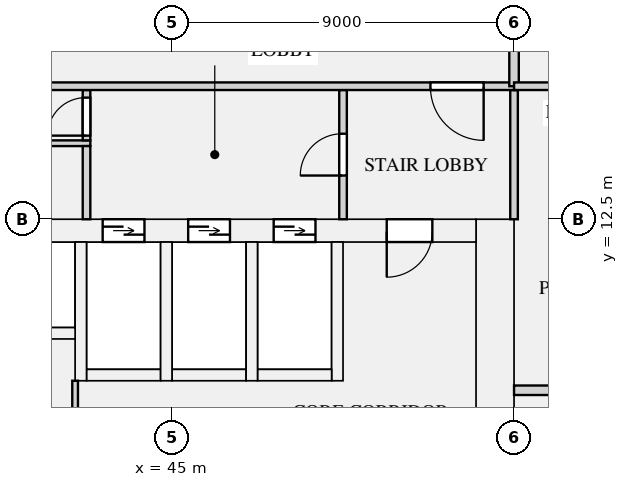
"""IFC4 building model, lengths in metres.
Left out: names, types, materials, properties, quantities, classifications, styles, units other than length and angle.
Written with IfcOpenShell. Run it as: python <this file> out.ifc"""

import sys

from ifc_helpers import new_model, si_unit, direction, frame, frame_2d, origin, place, context, subcontext, project, spatial, rectangle, extrude, element, fill, save


model = new_model("IFC4")
c1 = context("Model", 3, precision=1e-05, world=origin(), true_north=direction((0.0, 1.0)))
c2 = subcontext(c1, "Body", "Model", "MODEL_VIEW")
j1 = project(units=[si_unit("LENGTHUNIT", "METRE"), si_unit("PLANEANGLEUNIT", "RADIAN")], contexts=[c1])
p1 = place(None, origin())
s1 = spatial("IfcSite", under=j1, at=p1, CompositionType="ELEMENT")
p2 = place(p1, origin())
s2 = spatial("IfcBuilding", under=s1, at=p2, CompositionType="ELEMENT")
p3 = place(p2, frame((0.0, 0.0, 6.5)))
s3 = spatial("IfcBuildingStorey", under=s2, at=p3, CompositionType="ELEMENT", Elevation=6.5)
p4 = place(p3, frame((53.5, 0.0, 0.0), z_axis=(0.0, 0.0, 1.0), x_axis=(0.0, 1.0, 0.0)))
e1 = element("IfcWall", 1, at=p4, inside=s3, PredefinedType="SHEAR", context=c2, shape_type="SweptSolid", body=[
    extrude(rectangle(XDim=12.5, YDim=1.0, at=frame_2d((6.25, 0.0))), origin(), (0.0, 0.0, 1.0), 4.5),
])
p5 = place(p3, frame((19.0, 12.2, 0.0), z_axis=(0.0, 0.0, 1.0), x_axis=(1.0, 0.0, 0.0)))
e2 = element("IfcWall", 2, at=p5, inside=s3, PredefinedType="SHEAR", context=c2, shape_type="SweptSolid", body=[
    extrude(rectangle(XDim=34.0, YDim=0.6, at=frame_2d((17.0, 0.0))), origin(), (0.0, 0.0, 1.0), 4.5),
])
p6 = place(p5, frame((4.475, 0.0, 0.0)))
e3 = element("IfcOpeningElement", 3, at=p6, cuts=e2, PredefinedType="OPENING", context=c2, shape_type="SweptSolid", body=[
    extrude(rectangle(XDim=1.2, YDim=2.1, at=frame_2d((0.6, 1.05))), frame((0.0, 0.31, 0.0), z_axis=(0.0, -1.0, 0.0), x_axis=(1.0, 0.0, 0.0)), (0.0, 0.0, 1.0), 0.62),
])
p7 = place(p5, frame((7.325, 0.0, 0.0)))
e4 = element("IfcOpeningElement", 4, at=p7, cuts=e2, PredefinedType="OPENING", context=c2, shape_type="SweptSolid", body=[
    extrude(rectangle(XDim=1.2, YDim=2.1, at=frame_2d((0.6, 1.05))), frame((0.0, 0.31, 0.0), z_axis=(0.0, -1.0, 0.0), x_axis=(1.0, 0.0, 0.0)), (0.0, 0.0, 1.0), 0.62),
])
p8 = place(p5, frame((10.175, 0.0, 0.0)))
e5 = element("IfcOpeningElement", 5, at=p8, cuts=e2, PredefinedType="OPENING", context=c2, shape_type="SweptSolid", body=[
    extrude(rectangle(XDim=1.2, YDim=2.1, at=frame_2d((0.6, 1.05))), frame((0.0, 0.31, 0.0), z_axis=(0.0, -1.0, 0.0), x_axis=(1.0, 0.0, 0.0)), (0.0, 0.0, 1.0), 0.62),
])
p9 = place(p5, frame((13.025, 0.0, 0.0)))
e6 = element("IfcOpeningElement", 6, at=p9, cuts=e2, PredefinedType="OPENING", context=c2, shape_type="SweptSolid", body=[
    extrude(rectangle(XDim=1.2, YDim=2.1, at=frame_2d((0.6, 1.05))), frame((0.0, 0.31, 0.0), z_axis=(0.0, -1.0, 0.0), x_axis=(1.0, 0.0, 0.0)), (0.0, 0.0, 1.0), 0.62),
])
p10 = place(p5, frame((15.875, 0.0, 0.0)))
e7 = element("IfcOpeningElement", 7, at=p10, cuts=e2, PredefinedType="OPENING", context=c2, shape_type="SweptSolid", body=[
    extrude(rectangle(XDim=1.2, YDim=2.1, at=frame_2d((0.6, 1.05))), frame((0.0, 0.31, 0.0), z_axis=(0.0, -1.0, 0.0), x_axis=(1.0, 0.0, 0.0)), (0.0, 0.0, 1.0), 0.62),
])
p11 = place(p5, frame((24.175, 0.0, 0.0)))
e8 = element("IfcOpeningElement", 8, at=p11, cuts=e2, PredefinedType="OPENING", context=c2, shape_type="SweptSolid", body=[
    extrude(rectangle(XDim=1.1, YDim=2.1, at=frame_2d((0.55, 1.05))), frame((0.0, 0.31, 0.0), z_axis=(0.0, -1.0, 0.0), x_axis=(1.0, 0.0, 0.0)), (0.0, 0.0, 1.0), 0.62),
])
p12 = place(p5, frame((26.425, 0.0, 0.0)))
e9 = element("IfcOpeningElement", 9, at=p12, cuts=e2, PredefinedType="OPENING", context=c2, shape_type="SweptSolid", body=[
    extrude(rectangle(XDim=1.1, YDim=2.1, at=frame_2d((0.55, 1.05))), frame((0.0, 0.31, 0.0), z_axis=(0.0, -1.0, 0.0), x_axis=(1.0, 0.0, 0.0)), (0.0, 0.0, 1.0), 0.62),
])
p13 = place(p5, frame((28.675, 0.0, 0.0)))
e10 = element("IfcOpeningElement", 10, at=p13, cuts=e2, PredefinedType="OPENING", context=c2, shape_type="SweptSolid", body=[
    extrude(rectangle(XDim=1.1, YDim=2.1, at=frame_2d((0.55, 1.05))), frame((0.0, 0.31, 0.0), z_axis=(0.0, -1.0, 0.0), x_axis=(1.0, 0.0, 0.0)), (0.0, 0.0, 1.0), 0.62),
])
p14 = place(p5, frame((1.15, 0.0, 0.0)))
e11 = element("IfcOpeningElement", 11, at=p14, cuts=e2, PredefinedType="OPENING", context=c2, shape_type="SweptSolid", body=[
    extrude(rectangle(XDim=1.2, YDim=2.1, at=frame_2d((0.6, 1.05))), frame((0.0, 0.31, 0.0), z_axis=(0.0, -1.0, 0.0), x_axis=(1.0, 0.0, 0.0)), (0.0, 0.0, 1.0), 0.62),
])
p15 = place(p5, frame((31.65, 0.0, 0.0)))
e12 = element("IfcOpeningElement", 12, at=p15, cuts=e2, PredefinedType="OPENING", context=c2, shape_type="SweptSolid", body=[
    extrude(rectangle(XDim=1.2, YDim=2.1, at=frame_2d((0.6, 1.05))), frame((0.0, 0.31, 0.0), z_axis=(0.0, -1.0, 0.0), x_axis=(1.0, 0.0, 0.0)), (0.0, 0.0, 1.0), 0.62),
])
p16 = place(p3, frame((39.9, 9.5, 0.0), z_axis=(0.0, 0.0, 1.0), x_axis=(1.0, 0.0, 0.0)))
e13 = element("IfcWall", 13, at=p16, inside=s3, PredefinedType="SHEAR", context=c2, shape_type="SweptSolid", body=[
    extrude(rectangle(XDim=2.55, YDim=0.3, at=frame_2d((1.275, 0.0))), origin(), (0.0, 0.0, 1.0), 4.5),
])
p17 = place(p3, frame((42.75, 8.4, 0.0), z_axis=(0.0, 0.0, 1.0), x_axis=(1.0, 0.0, 0.0)))
e14 = element("IfcWall", 14, at=p17, inside=s3, PredefinedType="SHEAR", context=c2, shape_type="SweptSolid", body=[
    extrude(rectangle(XDim=1.95, YDim=0.3, at=frame_2d((0.975, 0.0))), origin(), (0.0, 0.0, 1.0), 4.5),
])
p18 = place(p3, frame((42.6, 8.25, 0.0), z_axis=(0.0, 0.0, 1.0), x_axis=(0.0, 1.0, 0.0)))
e15 = element("IfcWall", 15, at=p18, inside=s3, PredefinedType="SHEAR", context=c2, shape_type="SweptSolid", body=[
    extrude(rectangle(XDim=3.65, YDim=0.3, at=frame_2d((1.825, 0.0))), origin(), (0.0, 0.0, 1.0), 4.5),
])
p19 = place(p3, frame((45.0, 8.4, 0.0), z_axis=(0.0, 0.0, 1.0), x_axis=(1.0, 0.0, 0.0)))
e16 = element("IfcWall", 16, at=p19, inside=s3, PredefinedType="SHEAR", context=c2, shape_type="SweptSolid", body=[
    extrude(rectangle(XDim=1.95, YDim=0.3, at=frame_2d((0.975, 0.0))), origin(), (0.0, 0.0, 1.0), 4.5),
])
p20 = place(p3, frame((44.85, 8.25, 0.0), z_axis=(0.0, 0.0, 1.0), x_axis=(0.0, 1.0, 0.0)))
e17 = element("IfcWall", 17, at=p20, inside=s3, PredefinedType="SHEAR", context=c2, shape_type="SweptSolid", body=[
    extrude(rectangle(XDim=3.65, YDim=0.3, at=frame_2d((1.825, 0.0))), origin(), (0.0, 0.0, 1.0), 4.5),
])
p21 = place(p3, frame((47.25, 8.4, 0.0), z_axis=(0.0, 0.0, 1.0), x_axis=(1.0, 0.0, 0.0)))
e18 = element("IfcWall", 18, at=p21, inside=s3, PredefinedType="SHEAR", context=c2, shape_type="SweptSolid", body=[
    extrude(rectangle(XDim=1.95, YDim=0.3, at=frame_2d((0.975, 0.0))), origin(), (0.0, 0.0, 1.0), 4.5),
])
for number, where, z_axis, x_axis in (
    (19, (47.1, 8.25, 0.0), (0.0, 0.0, 1.0), (0.0, 1.0, 0.0)),
    (20, (49.35, 8.25, 0.0), (0.0, 0.0, 1.0), (0.0, 1.0, 0.0)),
):
    element("IfcWall", number, at=place(p3, frame(where, z_axis=z_axis, x_axis=x_axis)), inside=s3, PredefinedType="SHEAR", context=c2, shape_type="SweptSolid", body=[
        extrude(rectangle(XDim=3.65, YDim=0.3, at=frame_2d((1.825, 0.0))), origin(), (0.0, 0.0, 1.0), 4.5),
    ])
p22 = place(p3, frame((37.425, 14.5, 0.0), z_axis=(0.0, 0.0, 1.0), x_axis=(1.0, 0.0, 0.0)))
e21 = element("IfcWall", 21, at=p22, inside=s3, PredefinedType="PARTITIONING", context=c2, shape_type="SweptSolid", body=[
    extrude(rectangle(XDim=5.425, YDim=0.15, at=frame_2d((2.712, 0.0))), origin(), (0.0, 0.0, 1.0), 4.098),
])
p23 = place(p22, frame((2.25, 0.0, 0.0)))
e22 = element("IfcOpeningElement", 22, at=p23, cuts=e21, PredefinedType="OPENING", context=c2, shape_type="SweptSolid", body=[
    extrude(rectangle(XDim=0.9, YDim=2.1, at=frame_2d((0.45, 1.05))), frame((0.0, 0.085, 0.0), z_axis=(0.0, -1.0, 0.0), x_axis=(1.0, 0.0, 0.0)), (0.0, 0.0, 1.0), 0.17),
])
p24 = place(p3, frame((42.45, 6.65, 0.0), z_axis=(0.0, 0.0, 1.0), x_axis=(0.0, 1.0, 0.0)))
e23 = element("IfcWall", 23, at=p24, inside=s3, PredefinedType="PARTITIONING", context=c2, shape_type="SweptSolid", body=[
    extrude(rectangle(XDim=1.6, YDim=0.15, at=frame_2d((0.8, 0.0))), origin(), (0.0, 0.0, 1.0), 4.098),
])
p25 = place(p3, frame((42.75, 12.5, 0.0), z_axis=(0.0, 0.0, 1.0), x_axis=(0.0, 1.0, 0.0)))
e24 = element("IfcWall", 24, at=p25, inside=s3, PredefinedType="PARTITIONING", context=c2, shape_type="SweptSolid", body=[
    extrude(rectangle(XDim=1.925, YDim=0.2, at=frame_2d((0.962, 0.0))), origin(), (0.0, 0.0, 1.0), 4.098),
])
p26 = place(p3, frame((49.5, 12.5, 0.0), z_axis=(0.0, 0.0, 1.0), x_axis=(0.0, 1.0, 0.0)))
e25 = element("IfcWall", 25, at=p26, inside=s3, PredefinedType="PARTITIONING", context=c2, shape_type="SweptSolid", body=[
    extrude(rectangle(XDim=3.4, YDim=0.2, at=frame_2d((1.7, 0.0))), origin(), (0.0, 0.0, 1.0), 4.098),
])
p27 = place(p26, frame((1.15, 0.0, 0.0)))
e26 = element("IfcOpeningElement", 26, at=p27, cuts=e25, PredefinedType="OPENING", context=c2, shape_type="SweptSolid", body=[
    extrude(rectangle(XDim=1.1, YDim=2.1, at=frame_2d((0.55, 1.05))), frame((0.0, 0.11, 0.0), z_axis=(0.0, -1.0, 0.0), x_axis=(1.0, 0.0, 0.0)), (0.0, 0.0, 1.0), 0.22),
])
p28 = place(p3, frame((54.0, 12.5, 0.0), z_axis=(0.0, 0.0, 1.0), x_axis=(0.0, 1.0, 0.0)))
e27 = element("IfcWall", 27, at=p28, inside=s3, PredefinedType="PARTITIONING", context=c2, shape_type="SweptSolid", body=[
    extrude(rectangle(XDim=3.4, YDim=0.2, at=frame_2d((1.7, 0.0))), origin(), (0.0, 0.0, 1.0), 4.098),
])
p29 = place(p3, frame((42.75, 14.575, 0.0), z_axis=(0.0, 0.0, 1.0), x_axis=(0.0, 1.0, 0.0)))
e28 = element("IfcWall", 28, at=p29, inside=s3, PredefinedType="PARTITIONING", context=c2, shape_type="SweptSolid", body=[
    extrude(rectangle(XDim=1.325, YDim=0.2, at=frame_2d((0.663, 0.0))), origin(), (0.0, 0.0, 1.0), 4.098),
])
p30 = place(p29, frame((0.125, 0.0, 0.0)))
e29 = element("IfcOpeningElement", 29, at=p30, cuts=e28, PredefinedType="OPENING", context=c2, shape_type="SweptSolid", body=[
    extrude(rectangle(XDim=1.0, YDim=2.1, at=frame_2d((0.5, 1.05))), frame((0.0, 0.11, 0.0), z_axis=(0.0, -1.0, 0.0), x_axis=(1.0, 0.0, 0.0)), (0.0, 0.0, 1.0), 0.22),
])
p31 = place(p3, frame((17.9, 16.0, 0.0), z_axis=(0.0, 0.0, 1.0), x_axis=(1.0, 0.0, 0.0)))
e30 = element("IfcWall", 30, at=p31, inside=s3, PredefinedType="PARTITIONING", context=c2, shape_type="SweptSolid", body=[
    extrude(rectangle(XDim=36.2, YDim=0.2, at=frame_2d((18.1, 0.0))), origin(), (0.0, 0.0, 1.0), 4.098),
])
p32 = place(p31, frame((0.9, 0.0, 0.0)))
e31 = element("IfcOpeningElement", 31, at=p32, cuts=e30, PredefinedType="OPENING", context=c2, shape_type="SweptSolid", body=[
    extrude(rectangle(XDim=1.4, YDim=2.1, at=frame_2d((0.7, 1.05))), frame((0.0, 0.11, 0.0), z_axis=(0.0, -1.0, 0.0), x_axis=(1.0, 0.0, 0.0)), (0.0, 0.0, 1.0), 0.22),
])
p33 = place(p31, frame((33.9, 0.0, 0.0)))
e32 = element("IfcOpeningElement", 32, at=p33, cuts=e30, PredefinedType="OPENING", context=c2, shape_type="SweptSolid", body=[
    extrude(rectangle(XDim=1.4, YDim=2.1, at=frame_2d((0.7, 1.05))), frame((0.0, 0.11, 0.0), z_axis=(0.0, -1.0, 0.0), x_axis=(1.0, 0.0, 0.0)), (0.0, 0.0, 1.0), 0.22),
])
p34 = place(p3, frame((54.0, 16.0, 0.0), z_axis=(0.0, 0.0, 1.0), x_axis=(0.0, 1.0, 0.0)))
e33 = element("IfcWall", 33, at=p34, inside=s3, PredefinedType="PARTITIONING", context=c2, shape_type="SweptSolid", body=[
    extrude(rectangle(XDim=7.0, YDim=0.25, at=frame_2d((3.5, 0.0))), origin(), (0.0, 0.0, 1.0), 4.098),
])
p35 = place(p34, frame((2.6, 0.0, 0.0)))
e34 = element("IfcOpeningElement", 34, at=p35, cuts=e33, PredefinedType="OPENING", context=c2, shape_type="SweptSolid", body=[
    extrude(rectangle(XDim=1.8, YDim=2.4, at=frame_2d((0.9, 1.2))), frame((0.0, 0.135, 0.0), z_axis=(0.0, -1.0, 0.0), x_axis=(1.0, 0.0, 0.0)), (0.0, 0.0, 1.0), 0.27),
])
p36 = place(p3, frame((54.0, 16.0, 0.0), z_axis=(0.0, 0.0, 1.0), x_axis=(1.0, 0.0, 0.0)))
e35 = element("IfcWall", 35, at=p36, inside=s3, PredefinedType="PARTITIONING", context=c2, shape_type="SweptSolid", body=[
    extrude(rectangle(XDim=9.0, YDim=0.2, at=frame_2d((4.5, 0.0))), origin(), (0.0, 0.0, 1.0), 4.098),
])
p37 = place(p36, frame((3.6, 0.0, 0.0)))
e36 = element("IfcOpeningElement", 36, at=p37, cuts=e35, PredefinedType="OPENING", context=c2, shape_type="SweptSolid", body=[
    extrude(rectangle(XDim=1.8, YDim=2.4, at=frame_2d((0.9, 1.2))), frame((0.0, 0.11, 0.0), z_axis=(0.0, -1.0, 0.0), x_axis=(1.0, 0.0, 0.0)), (0.0, 0.0, 1.0), 0.22),
])
p38 = place(p3, frame((54.0, 8.0, 0.0), z_axis=(0.0, 0.0, 1.0), x_axis=(1.0, 0.0, 0.0)))
e37 = element("IfcWall", 37, at=p38, inside=s3, PredefinedType="PARTITIONING", context=c2, shape_type="SweptSolid", body=[
    extrude(rectangle(XDim=9.0, YDim=0.25, at=frame_2d((4.5, 0.0))), origin(), (0.0, 0.0, 1.0), 4.098),
])
p39 = place(p11, origin())
e38 = element("IfcDoor", 38, at=p39, inside=s3, OperationType="DOUBLE_DOOR_SLIDING", PredefinedType="DOOR", context=c2, shape_type="SweptSolid", body=[
    extrude(rectangle(XDim=1.1, YDim=2.1, at=frame_2d((0.55, 1.05))), frame((0.0, 0.025, 0.0), z_axis=(0.0, -1.0, 0.0), x_axis=(1.0, 0.0, 0.0)), (0.0, 0.0, 1.0), 0.05),
])
fill(e8, e38)
p40 = place(p12, origin())
e39 = element("IfcDoor", 39, at=p40, inside=s3, OperationType="DOUBLE_DOOR_SLIDING", PredefinedType="DOOR", context=c2, shape_type="SweptSolid", body=[
    extrude(rectangle(XDim=1.1, YDim=2.1, at=frame_2d((0.55, 1.05))), frame((0.0, 0.025, 0.0), z_axis=(0.0, -1.0, 0.0), x_axis=(1.0, 0.0, 0.0)), (0.0, 0.0, 1.0), 0.05),
])
fill(e9, e39)
p41 = place(p13, origin())
e40 = element("IfcDoor", 40, at=p41, inside=s3, OperationType="DOUBLE_DOOR_SLIDING", PredefinedType="DOOR", context=c2, shape_type="SweptSolid", body=[
    extrude(rectangle(XDim=1.1, YDim=2.1, at=frame_2d((0.55, 1.05))), frame((0.0, 0.025, 0.0), z_axis=(0.0, -1.0, 0.0), x_axis=(1.0, 0.0, 0.0)), (0.0, 0.0, 1.0), 0.05),
])
fill(e10, e40)
p42 = place(p15, frame((1.2, 0.0, 0.0), z_axis=(0.0, 0.0, 1.0), x_axis=(-1.0, 0.0, 0.0)))
e41 = element("IfcDoor", 41, at=p42, inside=s3, OperationType="SINGLE_SWING_RIGHT", PredefinedType="DOOR", context=c2, shape_type="SweptSolid", body=[
    extrude(rectangle(XDim=1.2, YDim=2.1, at=frame_2d((0.6, 1.05))), frame((0.0, 0.025, 0.0), z_axis=(0.0, -1.0, 0.0), x_axis=(1.0, 0.0, 0.0)), (0.0, 0.0, 1.0), 0.05),
])
fill(e12, e41)
p43 = place(p30, origin())
e42 = element("IfcDoor", 42, at=p43, inside=s3, OperationType="SINGLE_SWING_LEFT", PredefinedType="DOOR", context=c2, shape_type="SweptSolid", body=[
    extrude(rectangle(XDim=1.0, YDim=2.1, at=frame_2d((0.5, 1.05))), frame((0.0, 0.025, 0.0), z_axis=(0.0, -1.0, 0.0), x_axis=(1.0, 0.0, 0.0)), (0.0, 0.0, 1.0), 0.05),
])
fill(e29, e42)
p44 = place(p27, origin())
e43 = element("IfcDoor", 43, at=p44, inside=s3, OperationType="SINGLE_SWING_LEFT", PredefinedType="DOOR", context=c2, shape_type="SweptSolid", body=[
    extrude(rectangle(XDim=1.1, YDim=2.1, at=frame_2d((0.55, 1.05))), frame((0.0, 0.025, 0.0), z_axis=(0.0, -1.0, 0.0), x_axis=(1.0, 0.0, 0.0)), (0.0, 0.0, 1.0), 0.05),
])
fill(e26, e43)
p45 = place(p33, frame((1.4, 0.0, 0.0), z_axis=(0.0, 0.0, 1.0), x_axis=(-1.0, 0.0, 0.0)))
e44 = element("IfcDoor", 44, at=p45, inside=s3, OperationType="SINGLE_SWING_LEFT", PredefinedType="DOOR", context=c2, shape_type="SweptSolid", body=[
    extrude(rectangle(XDim=1.4, YDim=2.1, at=frame_2d((0.7, 1.05))), frame((0.0, 0.025, 0.0), z_axis=(0.0, -1.0, 0.0), x_axis=(1.0, 0.0, 0.0)), (0.0, 0.0, 1.0), 0.05),
])
fill(e32, e44)
save(model, sys.argv[1])
